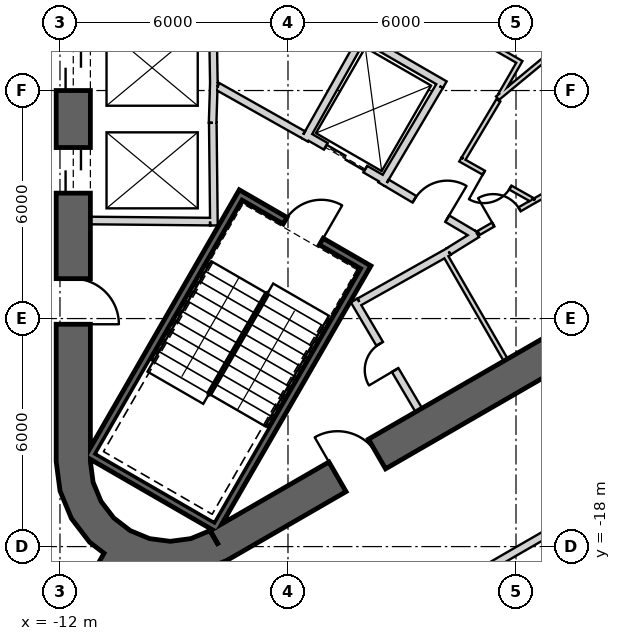
"""IFC4 building model, lengths in metres.
Left out: names, types, materials, properties, quantities, classifications, styles, units other than length and angle.
Written with IfcOpenShell. Run it as: python <this file> out.ifc"""

import sys

from ifc_helpers import new_model, si_unit, direction, frame, frame_2d, origin, place, context, subcontext, project, spatial, polyline, rectangle, outline, extrude, element, fill, save


model = new_model("IFC4")
c1 = context("Model", 3, precision=1e-05, world=origin(), true_north=direction((0.0, 1.0)))
c2 = subcontext(c1, "Body", "Model", "MODEL_VIEW")
j1 = project(units=[si_unit("LENGTHUNIT", "METRE"), si_unit("PLANEANGLEUNIT", "RADIAN")], contexts=[c1])
p1 = place(None, origin())
s1 = spatial("IfcSite", under=j1, at=p1, CompositionType="ELEMENT")
p2 = place(p1, origin())
s2 = spatial("IfcBuilding", under=s1, at=p2, CompositionType="ELEMENT")
p3 = place(p2, frame((0.0, 0.0, 345.5)))
s3 = spatial("IfcBuildingStorey", under=s2, at=p3, CompositionType="ELEMENT", Elevation=345.5)
p4 = place(p3, frame((-11.65, 15.762, 0.0), z_axis=(0.0, 0.0, 1.0), x_axis=(0.0, -1.0, 0.0)))
e1 = element("IfcWall", 1, at=p4, inside=s3, PredefinedType="SHEAR", context=c2, shape_type="SweptSolid", body=[
    extrude(rectangle(XDim=31.523, YDim=0.9, at=frame_2d((15.762, 0.0))), origin(), (0.0, 0.0, 1.0), 3.9),
])
p5 = place(p4, frame((7.062, 0.0, 0.0)))
e2 = element("IfcOpeningElement", 2, at=p5, cuts=e1, PredefinedType="OPENING", context=c2, shape_type="SweptSolid", body=[
    extrude(rectangle(XDim=1.2, YDim=2.4, at=frame_2d((0.6, 1.2))), frame((0.0, 0.46, 0.0), z_axis=(0.0, -1.0, 0.0), x_axis=(1.0, 0.0, 0.0)), (0.0, 0.0, 1.0), 0.92),
])
p6 = place(p4, frame((9.762, 0.0, 0.0)))
e3 = element("IfcOpeningElement", 3, at=p6, cuts=e1, PredefinedType="OPENING", context=c2, shape_type="SweptSolid", body=[
    extrude(rectangle(XDim=1.2, YDim=2.4, at=frame_2d((0.6, 1.2))), frame((0.0, 0.46, 0.0), z_axis=(0.0, -1.0, 0.0), x_axis=(1.0, 0.0, 0.0)), (0.0, 0.0, 1.0), 0.92),
])
p7 = place(p4, frame((12.462, 0.0, 0.0)))
e4 = element("IfcOpeningElement", 4, at=p7, cuts=e1, PredefinedType="OPENING", context=c2, shape_type="SweptSolid", body=[
    extrude(rectangle(XDim=1.2, YDim=2.4, at=frame_2d((0.6, 1.2))), frame((0.0, 0.46, 0.0), z_axis=(0.0, -1.0, 0.0), x_axis=(1.0, 0.0, 0.0)), (0.0, 0.0, 1.0), 0.92),
])
p8 = place(p4, frame((15.162, 0.0, 0.0)))
e5 = element("IfcOpeningElement", 5, at=p8, cuts=e1, PredefinedType="OPENING", context=c2, shape_type="SweptSolid", body=[
    extrude(rectangle(XDim=1.2, YDim=2.4, at=frame_2d((0.6, 1.2))), frame((0.0, 0.46, 0.0), z_axis=(0.0, -1.0, 0.0), x_axis=(1.0, 0.0, 0.0)), (0.0, 0.0, 1.0), 0.92),
])
p9 = place(p4, frame((17.862, 0.0, 0.0)))
e6 = element("IfcOpeningElement", 6, at=p9, cuts=e1, PredefinedType="OPENING", context=c2, shape_type="SweptSolid", body=[
    extrude(rectangle(XDim=1.2, YDim=2.4, at=frame_2d((0.6, 1.2))), frame((0.0, 0.46, 0.0), z_axis=(0.0, -1.0, 0.0), x_axis=(1.0, 0.0, 0.0)), (0.0, 0.0, 1.0), 0.92),
])
p10 = place(p4, frame((20.562, 0.0, 0.0)))
e7 = element("IfcOpeningElement", 7, at=p10, cuts=e1, PredefinedType="OPENING", context=c2, shape_type="SweptSolid", body=[
    extrude(rectangle(XDim=1.2, YDim=2.4, at=frame_2d((0.6, 1.2))), frame((0.0, 0.46, 0.0), z_axis=(0.0, -1.0, 0.0), x_axis=(1.0, 0.0, 0.0)), (0.0, 0.0, 1.0), 0.92),
])
p11 = place(p4, frame((23.262, 0.0, 0.0)))
e8 = element("IfcOpeningElement", 8, at=p11, cuts=e1, PredefinedType="OPENING", context=c2, shape_type="SweptSolid", body=[
    extrude(rectangle(XDim=1.2, YDim=2.4, at=frame_2d((0.6, 1.2))), frame((0.0, 0.46, 0.0), z_axis=(0.0, -1.0, 0.0), x_axis=(1.0, 0.0, 0.0)), (0.0, 0.0, 1.0), 0.92),
])
p12 = place(p4, frame((3.612, 0.0, 0.0)))
e9 = element("IfcOpeningElement", 9, at=p12, cuts=e1, PredefinedType="OPENING", context=c2, shape_type="SweptSolid", body=[
    extrude(rectangle(XDim=1.2, YDim=2.4, at=frame_2d((0.6, 1.2))), frame((0.0, 0.46, 0.0), z_axis=(0.0, -1.0, 0.0), x_axis=(1.0, 0.0, 0.0)), (0.0, 0.0, 1.0), 0.92),
])
p13 = place(p4, frame((26.712, 0.0, 0.0)))
e10 = element("IfcOpeningElement", 10, at=p13, cuts=e1, PredefinedType="OPENING", context=c2, shape_type="SweptSolid", body=[
    extrude(rectangle(XDim=1.2, YDim=2.4, at=frame_2d((0.6, 1.2))), frame((0.0, 0.46, 0.0), z_axis=(0.0, -1.0, 0.0), x_axis=(1.0, 0.0, 0.0)), (0.0, 0.0, 1.0), 0.92),
])
p14 = place(p3, frame((-7.825, -17.97, 0.0), z_axis=(0.0, 0.0, 1.0), x_axis=(0.866028369851, 0.499994862586, 0.0)))
e11 = element("IfcWall", 11, at=p14, inside=s3, PredefinedType="SHEAR", context=c2, shape_type="SweptSolid", body=[
    extrude(rectangle(XDim=31.523, YDim=0.9, at=frame_2d((15.762, 0.0))), origin(), (0.0, 0.0, 1.0), 3.9),
])
p15 = place(p14, frame((17.862, 0.0, 0.0)))
e12 = element("IfcOpeningElement", 12, at=p15, cuts=e11, PredefinedType="OPENING", context=c2, shape_type="SweptSolid", body=[
    extrude(rectangle(XDim=1.2, YDim=2.4, at=frame_2d((0.6, 1.2))), frame((0.0, 0.46, 0.0), z_axis=(0.0, -1.0, 0.0), x_axis=(1.0, 0.0, 0.0)), (0.0, 0.0, 1.0), 0.92),
])
p16 = place(p14, frame((20.562, 0.0, 0.0)))
e13 = element("IfcOpeningElement", 13, at=p16, cuts=e11, PredefinedType="OPENING", context=c2, shape_type="SweptSolid", body=[
    extrude(rectangle(XDim=1.2, YDim=2.4, at=frame_2d((0.6, 1.2))), frame((0.0, 0.46, 0.0), z_axis=(0.0, -1.0, 0.0), x_axis=(1.0, 0.0, 0.0)), (0.0, 0.0, 1.0), 0.92),
])
p17 = place(p14, frame((26.712, 0.0, 0.0)))
e14 = element("IfcOpeningElement", 14, at=p17, cuts=e11, PredefinedType="OPENING", context=c2, shape_type="SweptSolid", body=[
    extrude(rectangle(XDim=1.2, YDim=2.4, at=frame_2d((0.6, 1.2))), frame((0.0, 0.46, 0.0), z_axis=(0.0, -1.0, 0.0), x_axis=(1.0, 0.0, 0.0)), (0.0, 0.0, 1.0), 0.92),
])
p18 = place(p14, frame((3.612, 0.0, 0.0)))
e15 = element("IfcOpeningElement", 15, at=p18, cuts=e11, PredefinedType="OPENING", context=c2, shape_type="SweptSolid", body=[
    extrude(rectangle(XDim=1.2, YDim=2.4, at=frame_2d((0.6, 1.2))), frame((0.0, 0.46, 0.0), z_axis=(0.0, -1.0, 0.0), x_axis=(1.0, 0.0, 0.0)), (0.0, 0.0, 1.0), 0.92),
])
p19 = place(p3, origin())
e16 = element("IfcWall", 16, at=p19, inside=s3, PredefinedType="SHEAR", context=c2, shape_type="SweptSolid", body=[
    extrude(outline(polyline([(-12.1, -15.762), (-11.998, -16.538), (-11.698, -17.262), (-11.221, -17.883), (-10.6, -18.36), (-9.876, -18.659), (-9.1, -18.762), (-8.323, -18.659), (-7.6, -18.36), (-8.05, -17.58), (-8.556, -17.79), (-9.1, -17.862), (-9.644, -17.79), (-10.15, -17.58), (-10.585, -17.247), (-10.919, -16.812), (-11.128, -16.305), (-11.2, -15.762), (-12.1, -15.762)])), origin(), (0.0, 0.0, 1.0), 3.9),
])
p20 = place(p3, frame((-10.575, -18.316, 0.0), z_axis=(0.0, 0.0, 1.0), x_axis=(-0.500010354293, -0.866019425648, 0.0)))
e17 = element("IfcWall", 17, at=p20, inside=s3, PredefinedType="SHEAR", context=c2, shape_type="SweptSolid", body=[
    extrude(rectangle(XDim=7.854, YDim=0.6, at=frame_2d((3.927, 0.0))), origin(), (0.0, 0.0, 1.0), 3.9),
])
p21 = place(p20, frame((1.4, 0.0, 0.0)))
e18 = element("IfcOpeningElement", 18, at=p21, cuts=e17, PredefinedType="OPENING", context=c2, shape_type="SweptSolid", body=[
    extrude(rectangle(XDim=1.4, YDim=2.4, at=frame_2d((0.7, 1.2))), frame((0.0, 0.31, 0.0), z_axis=(0.0, -1.0, 0.0), x_axis=(1.0, 0.0, 0.0)), (0.0, 0.0, 1.0), 0.62),
])
p22 = place(p3, frame((-7.95, -5.772, 0.0), z_axis=(0.0, 0.0, 1.0), x_axis=(-0.030803413295, -0.999525462272, 0.0)))
e19 = element("IfcWall", 19, at=p22, inside=s3, PredefinedType="PLUMBINGWALL", context=c2, shape_type="SweptSolid", body=[
    extrude(rectangle(XDim=1.078, YDim=0.2, at=frame_2d((0.539, 0.0))), origin(), (0.0, 0.0, 1.0), 3.6),
])
p23 = place(p3, frame((-7.98, -4.05, 0.0), z_axis=(0.0, 0.0, 1.0), x_axis=(0.016809909365, -0.999858703491, 0.0)))
e20 = element("IfcWall", 20, at=p23, inside=s3, PredefinedType="PLUMBINGWALL", context=c2, shape_type="SweptSolid", body=[
    extrude(rectangle(XDim=1.844, YDim=0.2, at=frame_2d((0.922, 0.0))), origin(), (0.0, 0.0, 1.0), 3.6),
])
p24 = place(p3, frame((-7.979, -6.85, 0.0), z_axis=(0.0, 0.0, 1.0), x_axis=(0.011121475088, -0.999938154483, 0.0)))
e21 = element("IfcWall", 21, at=p24, inside=s3, PredefinedType="PLUMBINGWALL", context=c2, shape_type="SweptSolid", body=[
    extrude(rectangle(XDim=2.7, YDim=0.2, at=frame_2d((1.35, 0.0))), origin(), (0.0, 0.0, 1.0), 3.6),
])
p25 = place(p3, frame((-8.05, -9.449, 0.0), z_axis=(0.0, 0.0, 1.0), x_axis=(-0.999957467379, 0.009222983926, 0.0)))
e22 = element("IfcWall", 22, at=p25, inside=s3, PredefinedType="PLUMBINGWALL", context=c2, shape_type="SweptSolid", body=[
    extrude(rectangle(XDim=3.15, YDim=0.2, at=frame_2d((1.575, 0.0))), origin(), (0.0, 0.0, 1.0), 3.6),
])
p26 = place(p3, frame((-3.905, -10.563, -0.3), z_axis=(0.0, 0.0, 1.0), x_axis=(-0.500012932018, -0.866017937352, 0.0)))
e23 = element("IfcWall", 23, at=p26, inside=s3, PredefinedType="SHEAR", context=c2, shape_type="SweptSolid", body=[
    extrude(rectangle(XDim=8.1, YDim=0.2, at=frame_2d((4.05, 0.0))), origin(), (0.0, 0.0, 1.0), 3.9),
])
p27 = place(p3, frame((-11.282, -15.541, -0.3), z_axis=(0.0, 0.0, 1.0), x_axis=(0.866000483506, -0.500043160704, 0.0)))
e24 = element("IfcWall", 24, at=p27, inside=s3, PredefinedType="SHEAR", context=c2, shape_type="SweptSolid", body=[
    extrude(rectangle(XDim=3.8, YDim=0.2, at=frame_2d((1.9, 0.0))), origin(), (0.0, 0.0, 1.0), 3.9),
])
p28 = place(p3, frame((-7.196, -8.663, -0.3), z_axis=(0.0, 0.0, 1.0), x_axis=(-0.499997992926, -0.866026562566, 0.0)))
e25 = element("IfcWall", 25, at=p28, inside=s3, PredefinedType="SHEAR", context=c2, shape_type="SweptSolid", body=[
    extrude(rectangle(XDim=7.9, YDim=0.2, at=frame_2d((3.95, 0.0))), origin(), (0.0, 0.0, 1.0), 3.9),
])
p29 = place(p3, frame((-4.041, -10.599, -0.3), z_axis=(0.0, 0.0, 1.0), x_axis=(-0.866047807691, 0.499961193289, 0.0)))
e26 = element("IfcWall", 26, at=p29, inside=s3, PredefinedType="SHEAR", context=c2, shape_type="SweptSolid", body=[
    extrude(rectangle(XDim=3.6, YDim=0.2, at=frame_2d((1.8, 0.0))), origin(), (0.0, 0.0, 1.0), 3.9),
])
p30 = place(p29, frame((1.25, 0.0, 0.3)))
e27 = element("IfcOpeningElement", 27, at=p30, cuts=e26, PredefinedType="OPENING", context=c2, shape_type="SweptSolid", body=[
    extrude(rectangle(XDim=1.1, YDim=2.1, at=frame_2d((0.55, 1.05))), frame((0.0, 0.11, 0.0), z_axis=(0.0, -1.0, 0.0), x_axis=(1.0, 0.0, 0.0)), (0.0, 0.0, 1.0), 0.22),
])
p31 = place(p3, frame((-3.446, -8.368, 0.0), z_axis=(0.0, 0.0, 1.0), x_axis=(-0.866024647952, 0.500001309137, 0.0)))
e28 = element("IfcWall", 28, at=p31, inside=s3, PredefinedType="PLUMBINGWALL", context=c2, shape_type="SweptSolid", body=[
    extrude(rectangle(XDim=2.4, YDim=0.2, at=frame_2d((1.2, 0.0))), origin(), (0.0, 0.0, 1.0), 3.6),
])
p32 = place(p31, frame((0.6, 0.0, 0.0)))
e29 = element("IfcOpeningElement", 29, at=p32, cuts=e28, PredefinedType="OPENING", context=c2, shape_type="SweptSolid", body=[
    extrude(rectangle(XDim=1.2, YDim=2.4, at=frame_2d((0.6, 1.2))), frame((0.0, 0.11, 0.0), z_axis=(0.0, -1.0, 0.0), x_axis=(1.0, 0.0, 0.0)), (0.0, 0.0, 1.0), 0.22),
])
p33 = place(p3, frame((-5.562, -7.296, 0.0), z_axis=(0.0, 0.0, 1.0), x_axis=(0.491322718731, 0.870977603649, 0.0)))
e30 = element("IfcWall", 30, at=p33, inside=s3, PredefinedType="PLUMBINGWALL", context=c2, shape_type="SweptSolid", body=[
    extrude(rectangle(XDim=3.1, YDim=0.2, at=frame_2d((1.55, 0.0))), origin(), (0.0, 0.0, 1.0), 3.6),
])
p34 = place(p3, frame((-3.957, -4.644, 0.0), z_axis=(0.0, 0.0, 1.0), x_axis=(0.865991127953, -0.500059362782, 0.0)))
e31 = element("IfcWall", 31, at=p34, inside=s3, PredefinedType="PLUMBINGWALL", context=c2, shape_type="SweptSolid", body=[
    extrude(rectangle(XDim=2.405, YDim=0.2, at=frame_2d((1.202, 0.0))), origin(), (0.0, 0.0, 1.0), 3.6),
])
p35 = place(p3, frame((-2.012, -5.882, 0.0), z_axis=(0.0, 0.0, 1.0), x_axis=(-0.508619639323, -0.860991325447, 0.0)))
e32 = element("IfcWall", 32, at=p35, inside=s3, PredefinedType="PLUMBINGWALL", context=c2, shape_type="SweptSolid", body=[
    extrude(rectangle(XDim=3.0, YDim=0.2, at=frame_2d((1.5, 0.0))), origin(), (0.0, 0.0, 1.0), 3.6),
])
p36 = place(p3, frame((-1.897, -10.275, 0.0), z_axis=(0.0, 0.0, 1.0), x_axis=(0.499984717929, -0.866034226713, 0.0)))
e33 = element("IfcWall", 33, at=p36, inside=s3, PredefinedType="PARTITIONING", context=c2, shape_type="SweptSolid", body=[
    extrude(rectangle(XDim=3.25, YDim=0.12, at=frame_2d((1.625, 0.0))), origin(), (0.0, 0.0, 1.0), 3.6),
])
p37 = place(p3, frame((-4.26, -11.524, 0.0), z_axis=(0.0, 0.0, 1.0), x_axis=(0.507997497166, -0.861358544901, 0.0)))
e34 = element("IfcWall", 34, at=p37, inside=s3, PredefinedType="PARTITIONING", context=c2, shape_type="SweptSolid", body=[
    extrude(rectangle(XDim=3.35, YDim=0.2, at=frame_2d((1.675, 0.0))), origin(), (0.0, 0.0, 1.0), 3.6),
])
p38 = place(p37, frame((1.325, 0.0, 0.0)))
e35 = element("IfcOpeningElement", 35, at=p38, cuts=e34, PredefinedType="OPENING", context=c2, shape_type="SweptSolid", body=[
    extrude(rectangle(XDim=0.8, YDim=2.1, at=frame_2d((0.4, 1.05))), frame((0.0, 0.11, 0.0), z_axis=(0.0, -1.0, 0.0), x_axis=(1.0, 0.0, 0.0)), (0.0, 0.0, 1.0), 0.22),
])
p39 = place(p3, frame((-1.769, -10.237, 0.0), z_axis=(0.0, 0.0, 1.0), x_axis=(-0.871534483978, -0.490334215854, 0.0)))
e36 = element("IfcWall", 36, at=p39, inside=s3, PredefinedType="PARTITIONING", context=c2, shape_type="SweptSolid", body=[
    extrude(rectangle(XDim=2.7, YDim=0.2, at=frame_2d((1.35, 0.0))), origin(), (0.0, 0.0, 1.0), 3.6),
])
p40 = place(p3, frame((-1.024, -9.771, 0.0), z_axis=(0.0, 0.0, 1.0), x_axis=(-0.850348075135, -0.526220629693, 0.0)))
e37 = element("IfcWall", 37, at=p40, inside=s3, PredefinedType="PARTITIONING", context=c2, shape_type="SweptSolid", body=[
    extrude(rectangle(XDim=0.878, YDim=0.2, at=frame_2d((0.439, 0.0))), origin(), (0.0, 0.0, 1.0), 3.6),
])
p41 = place(p3, frame((0.494, -8.896, 0.0), z_axis=(0.0, 0.0, 1.0), x_axis=(0.871426548871, 0.490526013503, 0.0)))
e38 = element("IfcWall", 38, at=p41, inside=s3, PredefinedType="PARTITIONING", context=c2, shape_type="SweptSolid", body=[
    extrude(rectangle(XDim=2.67, YDim=0.12, at=frame_2d((1.335, 0.0))), origin(), (0.0, 0.0, 1.0), 3.6),
])
p42 = place(p3, frame((0.493, -8.895, 0.0), z_axis=(0.0, 0.0, 1.0), x_axis=(-0.866027945518, -0.499995597562, 0.0)))
e39 = element("IfcWall", 39, at=p42, inside=s3, PredefinedType="PARTITIONING", context=c2, shape_type="SweptSolid", body=[
    extrude(rectangle(XDim=1.702, YDim=0.12, at=frame_2d((0.851, 0.0))), origin(), (0.0, 0.0, 1.0), 3.6),
])
p43 = place(p42, frame((0.461, 0.0, 0.0)))
e40 = element("IfcOpeningElement", 40, at=p43, cuts=e39, PredefinedType="OPENING", context=c2, shape_type="SweptSolid", body=[
    extrude(rectangle(XDim=0.8, YDim=2.1, at=frame_2d((0.4, 1.05))), frame((0.0, 0.07, 0.0), z_axis=(0.0, -1.0, 0.0), x_axis=(1.0, 0.0, 0.0)), (0.0, 0.0, 1.0), 0.14),
])
p44 = place(p3, frame((-7.849, -5.894, 0.0), z_axis=(0.0, 0.0, 1.0), x_axis=(0.871340486379, -0.490678873396, 0.0)))
e41 = element("IfcWall", 41, at=p44, inside=s3, PredefinedType="PARTITIONING", context=c2, shape_type="SweptSolid", body=[
    extrude(rectangle(XDim=2.581, YDim=0.2, at=frame_2d((1.291, 0.0))), origin(), (0.0, 0.0, 1.0), 3.6),
])
p45 = place(p3, frame((-3.401, -8.43, 0.0), z_axis=(0.0, 0.0, 1.0), x_axis=(0.860617791406, -0.509251428192, 0.0)))
e42 = element("IfcWall", 42, at=p45, inside=s3, PredefinedType="PARTITIONING", context=c2, shape_type="SweptSolid", body=[
    extrude(rectangle(XDim=2.709, YDim=0.2, at=frame_2d((1.354, 0.0))), origin(), (0.0, 0.0, 1.0), 3.6),
])
p46 = place(p45, frame((0.848, 0.0, 0.0)))
e43 = element("IfcOpeningElement", 43, at=p46, cuts=e42, PredefinedType="OPENING", context=c2, shape_type="SweptSolid", body=[
    extrude(rectangle(XDim=1.0, YDim=2.1, at=frame_2d((0.5, 1.05))), frame((0.0, 0.11, 0.0), z_axis=(0.0, -1.0, 0.0), x_axis=(1.0, 0.0, 0.0)), (0.0, 0.0, 1.0), 0.22),
])
p47 = place(p3, frame((5.936, -0.894, 0.0), z_axis=(0.0, 0.0, 1.0), x_axis=(-0.770832870475, -0.637037428881, 0.0)))
e44 = element("IfcWall", 44, at=p47, inside=s3, PredefinedType="PARTITIONING", context=c2, shape_type="SweptSolid", body=[
    extrude(rectangle(XDim=8.332, YDim=0.12, at=frame_2d((4.166, 0.0))), origin(), (0.0, 0.0, 1.0), 3.6),
])
p48 = place(p3, frame((-0.411, -6.111, 0.0), z_axis=(0.0, 0.0, 1.0), x_axis=(0.49986229611, 0.866104892567, 0.0)))
e45 = element("IfcWall", 45, at=p48, inside=s3, PredefinedType="PARTITIONING", context=c2, shape_type="SweptSolid", body=[
    extrude(rectangle(XDim=1.058, YDim=0.12, at=frame_2d((0.529, 0.0))), origin(), (0.0, 0.0, 1.0), 3.6),
])
p49 = place(p3, frame((-1.436, -4.367, 0.0), z_axis=(0.0, 0.0, 1.0), x_axis=(0.866087547558, -0.499892348375, 0.0)))
e46 = element("IfcWall", 46, at=p49, inside=s3, PredefinedType="PARTITIONING", context=c2, shape_type="SweptSolid", body=[
    extrude(rectangle(XDim=1.7, YDim=0.12, at=frame_2d((0.85, 0.0))), origin(), (0.0, 0.0, 1.0), 3.6),
])
p50 = place(p3, frame((-1.464, -7.816, 0.0), z_axis=(0.0, 0.0, 1.0), x_axis=(0.871859859416, -0.489755434416, 0.0)))
e47 = element("IfcWall", 47, at=p50, inside=s3, PredefinedType="PARTITIONING", context=c2, shape_type="SweptSolid", body=[
    extrude(rectangle(XDim=2.155, YDim=0.12, at=frame_2d((1.077, 0.0))), origin(), (0.0, 0.0, 1.0), 3.6),
])
p51 = place(p50, frame((0.707, 0.0, 0.0)))
e48 = element("IfcOpeningElement", 48, at=p51, cuts=e47, PredefinedType="OPENING", context=c2, shape_type="SweptSolid", body=[
    extrude(rectangle(XDim=0.8, YDim=2.1, at=frame_2d((0.4, 1.05))), frame((0.0, 0.07, 0.0), z_axis=(0.0, -1.0, 0.0), x_axis=(1.0, 0.0, 0.0)), (0.0, 0.0, 1.0), 0.14),
])
p52 = place(p3, frame((-0.463, -6.257, 0.0), z_axis=(0.0, 0.0, 1.0), x_axis=(-0.512528878122, -0.858669988466, 0.0)))
e49 = element("IfcWall", 49, at=p52, inside=s3, PredefinedType="PARTITIONING", context=c2, shape_type="SweptSolid", body=[
    extrude(rectangle(XDim=1.79, YDim=0.12, at=frame_2d((0.895, 0.0))), origin(), (0.0, 0.0, 1.0), 3.6),
])
p53 = place(p3, frame((-6.505, -21.885, 0.0), z_axis=(0.0, 0.0, 1.0), x_axis=(0.86602457258, 0.500001439686, 0.0)))
e50 = element("IfcWall", 50, at=p53, inside=s3, PredefinedType="PARTITIONING", context=c2, shape_type="SweptSolid", body=[
    extrude(rectangle(XDim=32.952, YDim=0.2, at=frame_2d((16.476, 0.0))), origin(), (0.0, 0.0, 1.0), 2.97),
])
p54 = place(p53, frame((27.839, 0.0, 0.0)))
e51 = element("IfcOpeningElement", 51, at=p54, cuts=e50, PredefinedType="OPENING", context=c2, shape_type="SweptSolid", body=[
    extrude(rectangle(XDim=1.0, YDim=2.1, at=frame_2d((0.5, 1.05))), frame((0.0, 0.11, 0.0), z_axis=(0.0, -1.0, 0.0), x_axis=(1.0, 0.0, 0.0)), (0.0, 0.0, 1.0), 0.22),
])
p55 = place(p53, frame((15.873, 0.0, 0.0)))
e52 = element("IfcOpeningElement", 52, at=p55, cuts=e50, PredefinedType="OPENING", context=c2, shape_type="SweptSolid", body=[
    extrude(rectangle(XDim=1.0, YDim=2.1, at=frame_2d((0.5, 1.05))), frame((0.0, 0.11, 0.0), z_axis=(0.0, -1.0, 0.0), x_axis=(1.0, 0.0, 0.0)), (0.0, 0.0, 1.0), 0.22),
])
p56 = place(p53, frame((4.06, 0.0, 0.0)))
e53 = element("IfcOpeningElement", 53, at=p56, cuts=e50, PredefinedType="OPENING", context=c2, shape_type="SweptSolid", body=[
    extrude(rectangle(XDim=1.0, YDim=2.1, at=frame_2d((0.5, 1.05))), frame((0.0, 0.11, 0.0), z_axis=(0.0, -1.0, 0.0), x_axis=(1.0, 0.0, 0.0)), (0.0, 0.0, 1.0), 0.22),
])
p57 = place(p30, origin())
e54 = element("IfcDoor", 54, at=p57, inside=s3, OperationType="SINGLE_SWING_RIGHT", PredefinedType="USERDEFINED", context=c2, shape_type="SweptSolid", body=[
    extrude(rectangle(XDim=1.1, YDim=2.1, at=frame_2d((0.55, 1.05))), frame((0.0, 0.025, 0.0), z_axis=(0.0, -1.0, 0.0), x_axis=(1.0, 0.0, 0.0)), (0.0, 0.0, 1.0), 0.05),
])
fill(e27, e54)
p58 = place(p46, origin())
e55 = element("IfcDoor", 55, at=p58, inside=s3, OperationType="SINGLE_SWING_RIGHT", PredefinedType="USERDEFINED", context=c2, shape_type="SweptSolid", body=[
    extrude(rectangle(XDim=1.0, YDim=2.1, at=frame_2d((0.5, 1.05))), frame((0.0, 0.025, 0.0), z_axis=(0.0, -1.0, 0.0), x_axis=(1.0, 0.0, 0.0)), (0.0, 0.0, 1.0), 0.05),
])
fill(e43, e55)
p59 = place(p32, origin())
e56 = element("IfcDoor", 56, at=p59, inside=s3, OperationType="SLIDING_TO_LEFT", PredefinedType="USERDEFINED", context=c2, shape_type="SweptSolid", body=[
    extrude(rectangle(XDim=1.2, YDim=2.4, at=frame_2d((0.6, 1.2))), frame((0.0, 0.025, 0.0), z_axis=(0.0, -1.0, 0.0), x_axis=(1.0, 0.0, 0.0)), (0.0, 0.0, 1.0), 0.05),
])
fill(e29, e56)
p60 = place(p51, origin())
e57 = element("IfcDoor", 57, at=p60, inside=s3, OperationType="SINGLE_SWING_RIGHT", PredefinedType="USERDEFINED", context=c2, shape_type="SweptSolid", body=[
    extrude(rectangle(XDim=0.8, YDim=2.1, at=frame_2d((0.4, 1.05))), frame((0.0, 0.025, 0.0), z_axis=(0.0, -1.0, 0.0), x_axis=(1.0, 0.0, 0.0)), (0.0, 0.0, 1.0), 0.05),
])
fill(e48, e57)
p61 = place(p38, origin())
e58 = element("IfcDoor", 58, at=p61, inside=s3, OperationType="SINGLE_SWING_LEFT", PredefinedType="USERDEFINED", context=c2, shape_type="SweptSolid", body=[
    extrude(rectangle(XDim=0.8, YDim=2.1, at=frame_2d((0.4, 1.05))), frame((0.0, 0.025, 0.0), z_axis=(0.0, -1.0, 0.0), x_axis=(1.0, 0.0, 0.0)), (0.0, 0.0, 1.0), 0.05),
])
fill(e35, e58)
p62 = place(p43, origin())
e59 = element("IfcDoor", 59, at=p62, inside=s3, OperationType="SINGLE_SWING_LEFT", PredefinedType="USERDEFINED", context=c2, shape_type="SweptSolid", body=[
    extrude(rectangle(XDim=0.8, YDim=2.1, at=frame_2d((0.4, 1.05))), frame((0.0, 0.025, 0.0), z_axis=(0.0, -1.0, 0.0), x_axis=(1.0, 0.0, 0.0)), (0.0, 0.0, 1.0), 0.05),
])
fill(e40, e59)
p63 = place(p10, origin())
e60 = element("IfcDoor", 60, at=p63, inside=s3, OperationType="SLIDING_TO_LEFT", PredefinedType="USERDEFINED", context=c2, shape_type="SweptSolid", body=[
    extrude(rectangle(XDim=1.2, YDim=2.4, at=frame_2d((0.6, 1.2))), frame((0.0, 0.025, 0.0), z_axis=(0.0, -1.0, 0.0), x_axis=(1.0, 0.0, 0.0)), (0.0, 0.0, 1.0), 0.05),
])
fill(e7, e60)
p64 = place(p11, origin())
e61 = element("IfcDoor", 61, at=p64, inside=s3, OperationType="SLIDING_TO_LEFT", PredefinedType="USERDEFINED", context=c2, shape_type="SweptSolid", body=[
    extrude(rectangle(XDim=1.2, YDim=2.4, at=frame_2d((0.6, 1.2))), frame((0.0, 0.025, 0.0), z_axis=(0.0, -1.0, 0.0), x_axis=(1.0, 0.0, 0.0)), (0.0, 0.0, 1.0), 0.05),
])
fill(e8, e61)
p65 = place(p13, origin())
e62 = element("IfcDoor", 62, at=p65, inside=s3, OperationType="SINGLE_SWING_RIGHT", PredefinedType="USERDEFINED", context=c2, shape_type="SweptSolid", body=[
    extrude(rectangle(XDim=1.2, YDim=2.4, at=frame_2d((0.6, 1.2))), frame((0.0, 0.025, 0.0), z_axis=(0.0, -1.0, 0.0), x_axis=(1.0, 0.0, 0.0)), (0.0, 0.0, 1.0), 0.05),
])
fill(e10, e62)
p66 = place(p18, origin())
e63 = element("IfcDoor", 63, at=p66, inside=s3, OperationType="SINGLE_SWING_LEFT", PredefinedType="USERDEFINED", context=c2, shape_type="SweptSolid", body=[
    extrude(rectangle(XDim=1.2, YDim=2.4, at=frame_2d((0.6, 1.2))), frame((0.0, 0.025, 0.0), z_axis=(0.0, -1.0, 0.0), x_axis=(1.0, 0.0, 0.0)), (0.0, 0.0, 1.0), 0.05),
])
fill(e15, e63)
save(model, sys.argv[1])
